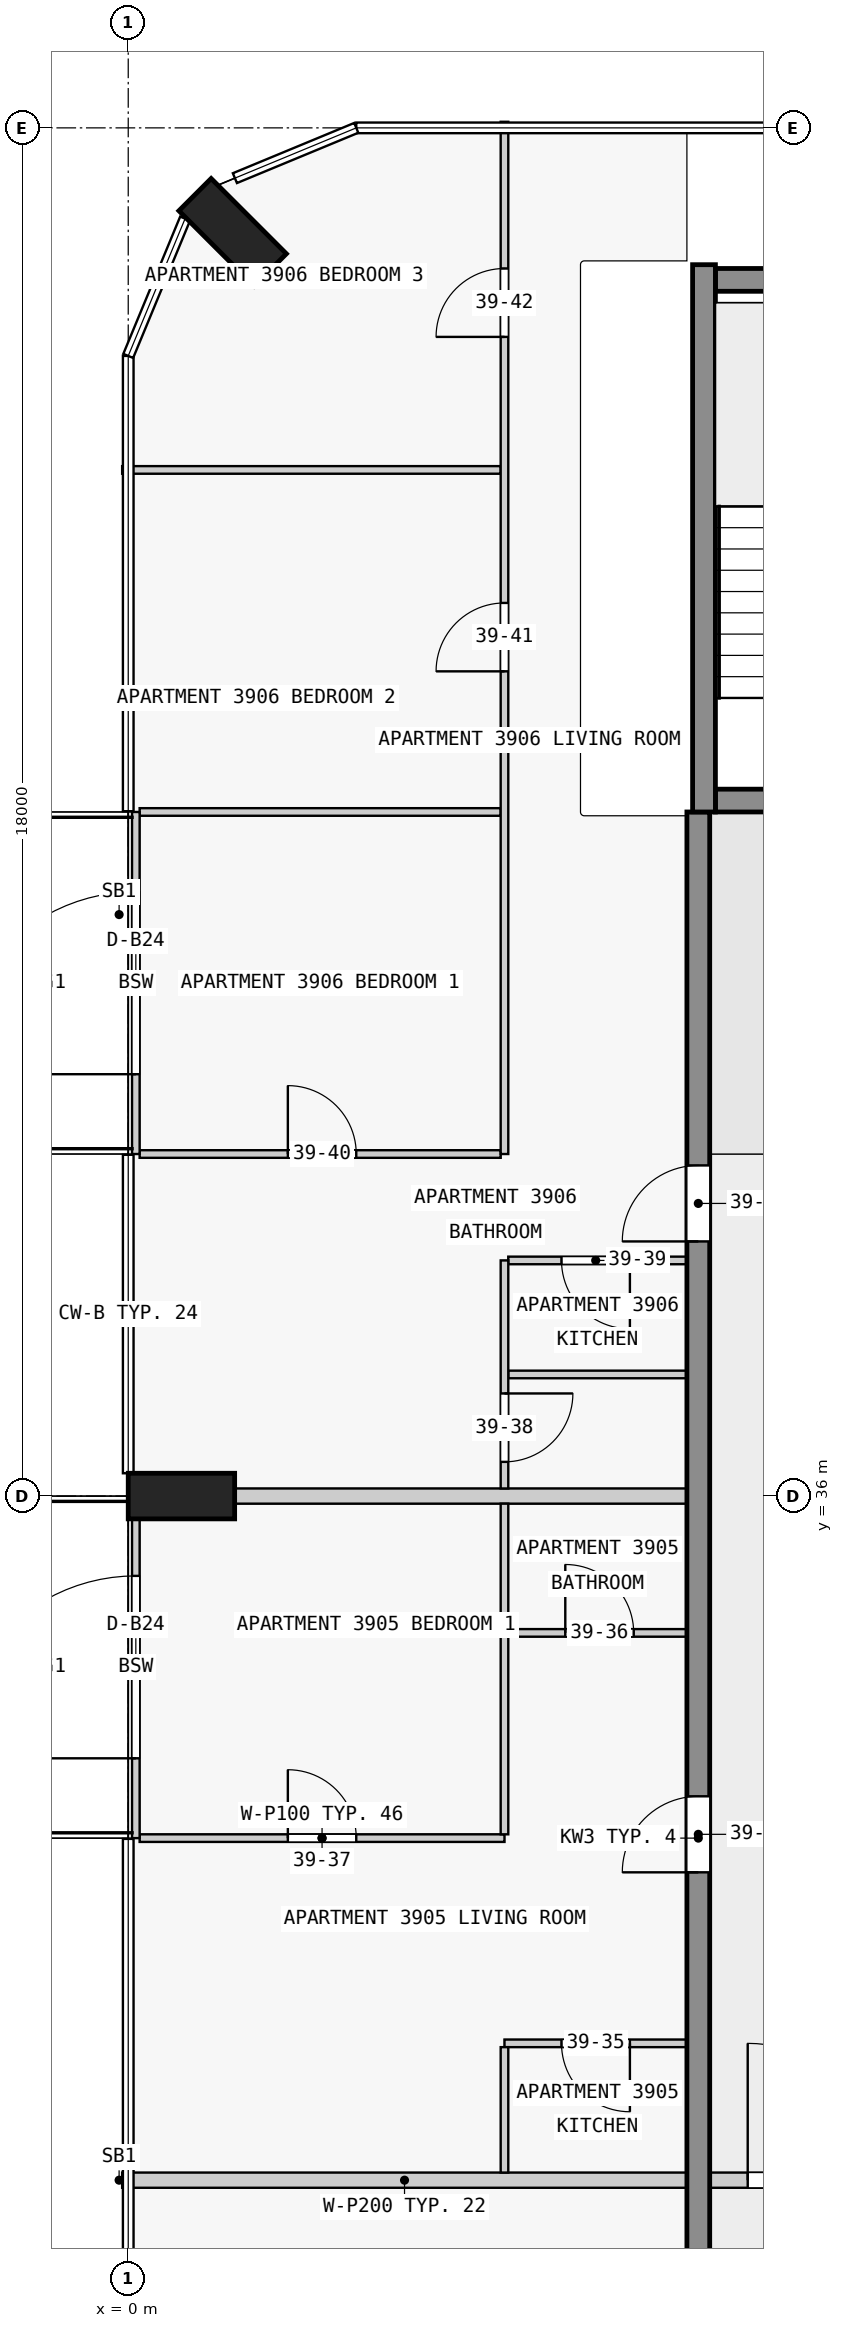
"""IFC4 building model, lengths in metres.
Left out: names, types, materials, properties, quantities, classifications, styles, units other than length and angle.
Written with IfcOpenShell. Run it as: python <this file> out.ifc"""

import sys

from ifc_helpers import new_model, si_unit, direction, frame, frame_2d, origin, origin_2d, place, context, subcontext, project, spatial, rectangle, extrude, element, fill, save


model = new_model("IFC4")
c1 = context("Model", 3, precision=1e-05, world=origin(), true_north=direction((0.0, 1.0)))
c2 = subcontext(c1, "Body", "Model", "MODEL_VIEW")
j1 = project(units=[si_unit("LENGTHUNIT", "METRE"), si_unit("PLANEANGLEUNIT", "RADIAN")], contexts=[c1])
p1 = place(None, origin())
s1 = spatial("IfcSite", under=j1, at=p1, CompositionType="ELEMENT")
p2 = place(p1, origin())
s2 = spatial("IfcBuilding", under=s1, at=p2, CompositionType="ELEMENT")
p3 = place(p2, frame((0.0, 0.0, 153.4)))
s3 = spatial("IfcBuildingStorey", under=s2, at=p3, CompositionType="ELEMENT", Elevation=153.4)
for number, where, z_axis, x_axis in (
    (1, (1.374, 52.626, 0.0), (0.0, 0.0, 1.0), (0.707, 0.707, 0.0)),
    (2, (0.7, 36.0, 0.0), (0.0, 0.0, 1.0), (0.0, 1.0, 0.0)),
):
    element("IfcColumn", number, at=place(p3, frame(where, z_axis=z_axis, x_axis=x_axis)), inside=s3, PredefinedType="COLUMN", context=c2, shape_type="SweptSolid", body=[
        extrude(rectangle(XDim=0.6, YDim=1.4, at=origin_2d()), origin(), (0.0, 0.0, 1.0), 3.5),
    ])
p4 = place(p3, frame((7.725, 45.15, 0.0), z_axis=(0.0, 0.0, 1.0), x_axis=(1.0, 0.0, 0.0)))
e3 = element("IfcWall", 3, at=p4, inside=s3, PredefinedType="SHEAR", context=c2, shape_type="SweptSolid", body=[
    extrude(rectangle(XDim=2.55, YDim=0.3, at=frame_2d((1.275, 0.0))), origin(), (0.0, 0.0, 1.0), 3.5),
])
p5 = place(p4, frame((0.725, 0.0, 0.0)))
e4 = element("IfcOpeningElement", 4, at=p5, cuts=e3, PredefinedType="OPENING", context=c2, shape_type="SweptSolid", body=[
    extrude(rectangle(XDim=1.1, YDim=2.1, at=frame_2d((0.55, 1.05))), frame((0.0, 0.16, 0.0), z_axis=(0.0, -1.0, 0.0), x_axis=(1.0, 0.0, 0.0)), (0.0, 0.0, 1.0), 0.32),
])
p6 = place(p3, frame((7.725, 52.0, 0.0), z_axis=(0.0, 0.0, 1.0), x_axis=(1.0, 0.0, 0.0)))
e5 = element("IfcWall", 5, at=p6, inside=s3, PredefinedType="SHEAR", context=c2, shape_type="SweptSolid", body=[
    extrude(rectangle(XDim=2.55, YDim=0.3, at=frame_2d((1.275, 0.0))), origin(), (0.0, 0.0, 1.0), 3.5),
])
p7 = place(p3, frame((7.575, 45.0, 0.0), z_axis=(0.0, 0.0, 1.0), x_axis=(0.0, 1.0, 0.0)))
e6 = element("IfcWall", 6, at=p7, inside=s3, PredefinedType="SHEAR", context=c2, shape_type="SweptSolid", body=[
    extrude(rectangle(XDim=7.2, YDim=0.3, at=frame_2d((3.6, 0.0))), origin(), (0.0, 0.0, 1.0), 3.5),
])
p8 = place(p3, frame((7.5, 18.0, 0.0), z_axis=(0.0, 0.0, 1.0), x_axis=(0.0, 1.0, 0.0)))
e7 = element("IfcWall", 7, at=p8, inside=s3, PredefinedType="SHEAR", context=c2, shape_type="SweptSolid", body=[
    extrude(rectangle(XDim=27.0, YDim=0.3, at=frame_2d((13.5, 0.0))), origin(), (0.0, 0.0, 1.0), 3.25),
])
p9 = place(p8, frame((1.75, 0.0, 0.0)))
e8 = element("IfcOpeningElement", 8, at=p9, cuts=e7, PredefinedType="OPENING", context=c2, shape_type="SweptSolid", body=[
    extrude(rectangle(XDim=1.0, YDim=2.1, at=frame_2d((0.5, 1.05))), frame((0.0, 0.16, 0.0), z_axis=(0.0, -1.0, 0.0), x_axis=(1.0, 0.0, 0.0)), (0.0, 0.0, 1.0), 0.32),
])
p10 = place(p8, frame((5.85, 0.0, 0.0)))
e9 = element("IfcOpeningElement", 9, at=p10, cuts=e7, PredefinedType="OPENING", context=c2, shape_type="SweptSolid", body=[
    extrude(rectangle(XDim=1.8, YDim=2.1, at=frame_2d((0.9, 1.05))), frame((0.0, 0.16, 0.0), z_axis=(0.0, -1.0, 0.0), x_axis=(1.0, 0.0, 0.0)), (0.0, 0.0, 1.0), 0.32),
])
p11 = place(p8, frame((13.05, 0.0, 0.0)))
e10 = element("IfcOpeningElement", 10, at=p11, cuts=e7, PredefinedType="OPENING", context=c2, shape_type="SweptSolid", body=[
    extrude(rectangle(XDim=1.0, YDim=2.1, at=frame_2d((0.5, 1.05))), frame((0.0, 0.16, 0.0), z_axis=(0.0, -1.0, 0.0), x_axis=(1.0, 0.0, 0.0)), (0.0, 0.0, 1.0), 0.32),
])
p12 = place(p8, frame((21.35, 0.0, 0.0)))
e11 = element("IfcOpeningElement", 11, at=p12, cuts=e7, PredefinedType="OPENING", context=c2, shape_type="SweptSolid", body=[
    extrude(rectangle(XDim=1.0, YDim=2.1, at=frame_2d((0.5, 1.05))), frame((0.0, 0.16, 0.0), z_axis=(0.0, -1.0, 0.0), x_axis=(1.0, 0.0, 0.0)), (0.0, 0.0, 1.0), 0.32),
])
p13 = place(p3, frame((0.1, 31.5, 0.0), z_axis=(0.0, 0.0, 1.0), x_axis=(0.0, 1.0, 0.0)))
e12 = element("IfcWall", 12, at=p13, inside=s3, PredefinedType="STANDARD", context=c2, shape_type="SweptSolid", body=[
    extrude(rectangle(XDim=4.5, YDim=0.1, at=frame_2d((2.25, 0.0))), origin(), (0.0, 0.0, 1.0), 3.25),
])
p14 = place(p13, frame((1.05, 0.0, 0.0)))
e13 = element("IfcOpeningElement", 13, at=p14, cuts=e12, PredefinedType="OPENING", context=c2, shape_type="SweptSolid", body=[
    extrude(rectangle(XDim=2.4, YDim=2.4, at=frame_2d((1.2, 1.2))), frame((0.0, 0.06, 0.0), z_axis=(0.0, -1.0, 0.0), x_axis=(1.0, 0.0, 0.0)), (0.0, 0.0, 1.0), 0.12),
])
p15 = place(p3, frame((0.1, 40.5, 0.0), z_axis=(0.0, 0.0, 1.0), x_axis=(0.0, 1.0, 0.0)))
e14 = element("IfcWall", 14, at=p15, inside=s3, PredefinedType="STANDARD", context=c2, shape_type="SweptSolid", body=[
    extrude(rectangle(XDim=4.5, YDim=0.1, at=frame_2d((2.25, 0.0))), origin(), (0.0, 0.0, 1.0), 3.25),
])
p16 = place(p15, frame((1.05, 0.0, 0.0)))
e15 = element("IfcOpeningElement", 15, at=p16, cuts=e14, PredefinedType="OPENING", context=c2, shape_type="SweptSolid", body=[
    extrude(rectangle(XDim=2.4, YDim=2.4, at=frame_2d((1.2, 1.2))), frame((0.0, 0.06, 0.0), z_axis=(0.0, -1.0, 0.0), x_axis=(1.0, 0.0, 0.0)), (0.0, 0.0, 1.0), 0.12),
])
p17 = place(p3, frame((7.35, 27.0, 0.0), z_axis=(0.0, 0.0, 1.0), x_axis=(-1.0, 0.0, 0.0)))
e16 = element("IfcWall", 16, at=p17, inside=s3, PredefinedType="PARTITIONING", context=c2, shape_type="SweptSolid", body=[
    extrude(rectangle(XDim=7.43, YDim=0.2, at=frame_2d((3.715, 0.0))), origin(), (0.0, 0.0, 1.0), 3.25),
])
p18 = place(p3, frame((7.35, 28.8, 0.0), z_axis=(0.0, 0.0, 1.0), x_axis=(-1.0, 0.0, 0.0)))
e17 = element("IfcWall", 17, at=p18, inside=s3, PredefinedType="PARTITIONING", context=c2, shape_type="SweptSolid", body=[
    extrude(rectangle(XDim=2.4, YDim=0.1, at=frame_2d((1.2, 0.0))), origin(), (0.0, 0.0, 1.0), 3.25),
])
p19 = place(p18, frame((0.75, 0.0, 0.0)))
e18 = element("IfcOpeningElement", 18, at=p19, cuts=e17, PredefinedType="OPENING", context=c2, shape_type="SweptSolid", body=[
    extrude(rectangle(XDim=0.9, YDim=2.1, at=frame_2d((0.45, 1.05))), frame((0.0, 0.06, 0.0), z_axis=(0.0, -1.0, 0.0), x_axis=(1.0, 0.0, 0.0)), (0.0, 0.0, 1.0), 0.12),
])
p20 = place(p3, frame((0.15, 31.5, 0.0), z_axis=(0.0, 0.0, 1.0), x_axis=(1.0, 0.0, 0.0)))
e19 = element("IfcWall", 19, at=p20, inside=s3, PredefinedType="PARTITIONING", context=c2, shape_type="SweptSolid", body=[
    extrude(rectangle(XDim=4.8, YDim=0.1, at=frame_2d((2.4, 0.0))), origin(), (0.0, 0.0, 1.0), 3.25),
])
p21 = place(p20, frame((1.95, 0.0, 0.0)))
e20 = element("IfcOpeningElement", 20, at=p21, cuts=e19, PredefinedType="OPENING", context=c2, shape_type="SweptSolid", body=[
    extrude(rectangle(XDim=0.9, YDim=2.1, at=frame_2d((0.45, 1.05))), frame((0.0, 0.06, 0.0), z_axis=(0.0, -1.0, 0.0), x_axis=(1.0, 0.0, 0.0)), (0.0, 0.0, 1.0), 0.12),
])
p22 = place(p3, frame((5.0, 34.2, 0.0), z_axis=(0.0, 0.0, 1.0), x_axis=(1.0, 0.0, 0.0)))
e21 = element("IfcWall", 21, at=p22, inside=s3, PredefinedType="PARTITIONING", context=c2, shape_type="SweptSolid", body=[
    extrude(rectangle(XDim=2.35, YDim=0.1, at=frame_2d((1.175, 0.0))), origin(), (0.0, 0.0, 1.0), 3.25),
])
p23 = place(p22, frame((0.75, 0.0, 0.0)))
e22 = element("IfcOpeningElement", 22, at=p23, cuts=e21, PredefinedType="OPENING", context=c2, shape_type="SweptSolid", body=[
    extrude(rectangle(XDim=0.9, YDim=2.1, at=frame_2d((0.45, 1.05))), frame((0.0, 0.06, 0.0), z_axis=(0.0, -1.0, 0.0), x_axis=(1.0, 0.0, 0.0)), (0.0, 0.0, 1.0), 0.12),
])
p24 = place(p3, frame((7.35, 36.0, 0.0), z_axis=(0.0, 0.0, 1.0), x_axis=(-1.0, 0.0, 0.0)))
e23 = element("IfcWall", 23, at=p24, inside=s3, PredefinedType="PARTITIONING", context=c2, shape_type="SweptSolid", body=[
    extrude(rectangle(XDim=5.95, YDim=0.2, at=frame_2d((2.975, 0.0))), origin(), (0.0, 0.0, 1.0), 3.25),
])
p25 = place(p3, frame((7.35, 37.6, 0.0), z_axis=(0.0, 0.0, 1.0), x_axis=(-1.0, 0.0, 0.0)))
e24 = element("IfcWall", 24, at=p25, inside=s3, PredefinedType="PARTITIONING", context=c2, shape_type="SweptSolid", body=[
    extrude(rectangle(XDim=2.35, YDim=0.1, at=frame_2d((1.175, 0.0))), origin(), (0.0, 0.0, 1.0), 3.25),
])
p26 = place(p3, frame((7.35, 39.1, 0.0), z_axis=(0.0, 0.0, 1.0), x_axis=(-1.0, 0.0, 0.0)))
e25 = element("IfcWall", 25, at=p26, inside=s3, PredefinedType="PARTITIONING", context=c2, shape_type="SweptSolid", body=[
    extrude(rectangle(XDim=2.35, YDim=0.1, at=frame_2d((1.175, 0.0))), origin(), (0.0, 0.0, 1.0), 3.25),
])
p27 = place(p26, frame((0.75, 0.0, 0.0)))
e26 = element("IfcOpeningElement", 26, at=p27, cuts=e25, PredefinedType="OPENING", context=c2, shape_type="SweptSolid", body=[
    extrude(rectangle(XDim=0.9, YDim=2.1, at=frame_2d((0.45, 1.05))), frame((0.0, 0.06, 0.0), z_axis=(0.0, -1.0, 0.0), x_axis=(1.0, 0.0, 0.0)), (0.0, 0.0, 1.0), 0.12),
])
p28 = place(p3, frame((0.15, 40.5, 0.0), z_axis=(0.0, 0.0, 1.0), x_axis=(1.0, 0.0, 0.0)))
e27 = element("IfcWall", 27, at=p28, inside=s3, PredefinedType="PARTITIONING", context=c2, shape_type="SweptSolid", body=[
    extrude(rectangle(XDim=4.75, YDim=0.1, at=frame_2d((2.375, 0.0))), origin(), (0.0, 0.0, 1.0), 3.25),
])
p29 = place(p28, frame((1.95, 0.0, 0.0)))
e28 = element("IfcOpeningElement", 28, at=p29, cuts=e27, PredefinedType="OPENING", context=c2, shape_type="SweptSolid", body=[
    extrude(rectangle(XDim=0.9, YDim=2.1, at=frame_2d((0.45, 1.05))), frame((0.0, 0.06, 0.0), z_axis=(0.0, -1.0, 0.0), x_axis=(1.0, 0.0, 0.0)), (0.0, 0.0, 1.0), 0.12),
])
p30 = place(p3, frame((4.9, 45.0, 0.0), z_axis=(0.0, 0.0, 1.0), x_axis=(-1.0, 0.0, 0.0)))
e29 = element("IfcWall", 29, at=p30, inside=s3, PredefinedType="PARTITIONING", context=c2, shape_type="SweptSolid", body=[
    extrude(rectangle(XDim=4.75, YDim=0.1, at=frame_2d((2.375, 0.0))), origin(), (0.0, 0.0, 1.0), 3.25),
])
p31 = place(p3, frame((4.9, 49.5, 0.0), z_axis=(0.0, 0.0, 1.0), x_axis=(-1.0, 0.0, 0.0)))
e30 = element("IfcWall", 30, at=p31, inside=s3, PredefinedType="PARTITIONING", context=c2, shape_type="SweptSolid", body=[
    extrude(rectangle(XDim=4.98, YDim=0.1, at=frame_2d((2.49, 0.0))), origin(), (0.0, 0.0, 1.0), 3.25),
])
p32 = place(p3, frame((4.95, 28.75, 0.0), z_axis=(0.0, 0.0, 1.0), x_axis=(0.0, -1.0, 0.0)))
e31 = element("IfcWall", 31, at=p32, inside=s3, PredefinedType="PARTITIONING", context=c2, shape_type="SweptSolid", body=[
    extrude(rectangle(XDim=1.65, YDim=0.1, at=frame_2d((0.825, 0.0))), origin(), (0.0, 0.0, 1.0), 3.25),
])
p33 = place(p3, frame((4.95, 35.9, 0.0), z_axis=(0.0, 0.0, 1.0), x_axis=(0.0, -1.0, 0.0)))
e32 = element("IfcWall", 32, at=p33, inside=s3, PredefinedType="PARTITIONING", context=c2, shape_type="SweptSolid", body=[
    extrude(rectangle(XDim=1.7, YDim=0.1, at=frame_2d((0.85, 0.0))), origin(), (0.0, 0.0, 1.0), 3.25),
])
p34 = place(p3, frame((4.95, 39.1, 0.0), z_axis=(0.0, 0.0, 1.0), x_axis=(0.0, -1.0, 0.0)))
e33 = element("IfcWall", 33, at=p34, inside=s3, PredefinedType="PARTITIONING", context=c2, shape_type="SweptSolid", body=[
    extrude(rectangle(XDim=3.0, YDim=0.1, at=frame_2d((1.5, 0.0))), origin(), (0.0, 0.0, 1.0), 3.25),
])
p35 = place(p34, frame((1.75, 0.0, 0.0)))
e34 = element("IfcOpeningElement", 34, at=p35, cuts=e33, PredefinedType="OPENING", context=c2, shape_type="SweptSolid", body=[
    extrude(rectangle(XDim=0.9, YDim=2.1, at=frame_2d((0.45, 1.05))), frame((0.0, 0.06, 0.0), z_axis=(0.0, -1.0, 0.0), x_axis=(1.0, 0.0, 0.0)), (0.0, 0.0, 1.0), 0.12),
])
p36 = place(p3, frame((4.95, 31.55, 0.0), z_axis=(0.0, 0.0, 1.0), x_axis=(0.0, 1.0, 0.0)))
e35 = element("IfcWall", 35, at=p36, inside=s3, PredefinedType="PARTITIONING", context=c2, shape_type="SweptSolid", body=[
    extrude(rectangle(XDim=2.6, YDim=0.1, at=frame_2d((1.3, 0.0))), origin(), (0.0, 0.0, 1.0), 3.25),
])
p37 = place(p3, frame((4.95, 40.5, 0.0), z_axis=(0.0, 0.0, 1.0), x_axis=(0.0, 1.0, 0.0)))
e36 = element("IfcWall", 36, at=p37, inside=s3, PredefinedType="PARTITIONING", context=c2, shape_type="SweptSolid", body=[
    extrude(rectangle(XDim=13.58, YDim=0.1, at=frame_2d((6.79, 0.0))), origin(), (0.0, 0.0, 1.0), 3.25),
])
p38 = place(p37, frame((6.35, 0.0, 0.0)))
e37 = element("IfcOpeningElement", 37, at=p38, cuts=e36, PredefinedType="OPENING", context=c2, shape_type="SweptSolid", body=[
    extrude(rectangle(XDim=0.9, YDim=2.1, at=frame_2d((0.45, 1.05))), frame((0.0, 0.06, 0.0), z_axis=(0.0, -1.0, 0.0), x_axis=(1.0, 0.0, 0.0)), (0.0, 0.0, 1.0), 0.12),
])
p39 = place(p37, frame((10.75, 0.0, 0.0)))
e38 = element("IfcOpeningElement", 38, at=p39, cuts=e36, PredefinedType="OPENING", context=c2, shape_type="SweptSolid", body=[
    extrude(rectangle(XDim=0.9, YDim=2.1, at=frame_2d((0.45, 1.05))), frame((0.0, 0.06, 0.0), z_axis=(0.0, -1.0, 0.0), x_axis=(1.0, 0.0, 0.0)), (0.0, 0.0, 1.0), 0.12),
])
p40 = place(p3, frame((7.45, 27.0, 0.0), z_axis=(0.0, 0.0, 1.0), x_axis=(1.0, 0.0, 0.0)))
e39 = element("IfcWall", 39, at=p40, inside=s3, PredefinedType="PARTITIONING", context=c2, shape_type="SweptSolid", body=[
    extrude(rectangle(XDim=3.2, YDim=0.2, at=frame_2d((1.6, 0.0))), origin(), (0.0, 0.0, 1.0), 3.25),
])
p41 = place(p40, frame((0.7, 0.0, 0.0)))
e40 = element("IfcOpeningElement", 40, at=p41, cuts=e39, PredefinedType="OPENING", context=c2, shape_type="SweptSolid", body=[
    extrude(rectangle(XDim=1.8, YDim=2.1, at=frame_2d((0.9, 1.05))), frame((0.0, 0.11, 0.0), z_axis=(0.0, -1.0, 0.0), x_axis=(1.0, 0.0, 0.0)), (0.0, 0.0, 1.0), 0.22),
])
p42 = place(p14, origin())
e41 = element("IfcDoor", 41, at=p42, inside=s3, OperationType="SINGLE_SWING_LEFT", PredefinedType="DOOR", context=c2, shape_type="SweptSolid", body=[
    extrude(rectangle(XDim=2.4, YDim=2.4, at=frame_2d((1.2, 1.2))), frame((0.0, 0.025, 0.0), z_axis=(0.0, -1.0, 0.0), x_axis=(1.0, 0.0, 0.0)), (0.0, 0.0, 1.0), 0.05),
])
fill(e13, e41)
p43 = place(p16, origin())
e42 = element("IfcDoor", 42, at=p43, inside=s3, OperationType="SINGLE_SWING_LEFT", PredefinedType="DOOR", context=c2, shape_type="SweptSolid", body=[
    extrude(rectangle(XDim=2.4, YDim=2.4, at=frame_2d((1.2, 1.2))), frame((0.0, 0.025, 0.0), z_axis=(0.0, -1.0, 0.0), x_axis=(1.0, 0.0, 0.0)), (0.0, 0.0, 1.0), 0.05),
])
fill(e15, e42)
p44 = place(p11, origin())
e43 = element("IfcDoor", 43, at=p44, inside=s3, OperationType="SINGLE_SWING_RIGHT", PredefinedType="DOOR", context=c2, shape_type="SweptSolid", body=[
    extrude(rectangle(XDim=1.0, YDim=2.1, at=frame_2d((0.5, 1.05))), frame((0.0, 0.025, 0.0), z_axis=(0.0, -1.0, 0.0), x_axis=(1.0, 0.0, 0.0)), (0.0, 0.0, 1.0), 0.05),
])
fill(e10, e43)
p45 = place(p12, origin())
e44 = element("IfcDoor", 44, at=p45, inside=s3, OperationType="SINGLE_SWING_RIGHT", PredefinedType="DOOR", context=c2, shape_type="SweptSolid", body=[
    extrude(rectangle(XDim=1.0, YDim=2.1, at=frame_2d((0.5, 1.05))), frame((0.0, 0.025, 0.0), z_axis=(0.0, -1.0, 0.0), x_axis=(1.0, 0.0, 0.0)), (0.0, 0.0, 1.0), 0.05),
])
fill(e11, e44)
p46 = place(p41, origin())
e45 = element("IfcDoor", 45, at=p46, inside=s3, OperationType="SINGLE_SWING_LEFT", PredefinedType="DOOR", context=c2, shape_type="SweptSolid", body=[
    extrude(rectangle(XDim=1.8, YDim=2.1, at=frame_2d((0.9, 1.05))), frame((0.0, 0.025, 0.0), z_axis=(0.0, -1.0, 0.0), x_axis=(1.0, 0.0, 0.0)), (0.0, 0.0, 1.0), 0.05),
])
fill(e40, e45)
p47 = place(p19, origin())
e46 = element("IfcDoor", 46, at=p47, inside=s3, OperationType="SINGLE_SWING_RIGHT", PredefinedType="DOOR", context=c2, shape_type="SweptSolid", body=[
    extrude(rectangle(XDim=0.9, YDim=2.1, at=frame_2d((0.45, 1.05))), frame((0.0, 0.025, 0.0), z_axis=(0.0, -1.0, 0.0), x_axis=(1.0, 0.0, 0.0)), (0.0, 0.0, 1.0), 0.05),
])
fill(e18, e46)
p48 = place(p23, origin())
e47 = element("IfcDoor", 47, at=p48, inside=s3, OperationType="SINGLE_SWING_RIGHT", PredefinedType="DOOR", context=c2, shape_type="SweptSolid", body=[
    extrude(rectangle(XDim=0.9, YDim=2.1, at=frame_2d((0.45, 1.05))), frame((0.0, 0.025, 0.0), z_axis=(0.0, -1.0, 0.0), x_axis=(1.0, 0.0, 0.0)), (0.0, 0.0, 1.0), 0.05),
])
fill(e22, e47)
p49 = place(p21, origin())
e48 = element("IfcDoor", 48, at=p49, inside=s3, OperationType="SINGLE_SWING_LEFT", PredefinedType="DOOR", context=c2, shape_type="SweptSolid", body=[
    extrude(rectangle(XDim=0.9, YDim=2.1, at=frame_2d((0.45, 1.05))), frame((0.0, 0.025, 0.0), z_axis=(0.0, -1.0, 0.0), x_axis=(1.0, 0.0, 0.0)), (0.0, 0.0, 1.0), 0.05),
])
fill(e20, e48)
p50 = place(p35, origin())
e49 = element("IfcDoor", 49, at=p50, inside=s3, OperationType="SINGLE_SWING_RIGHT", PredefinedType="DOOR", context=c2, shape_type="SweptSolid", body=[
    extrude(rectangle(XDim=0.9, YDim=2.1, at=frame_2d((0.45, 1.05))), frame((0.0, 0.025, 0.0), z_axis=(0.0, -1.0, 0.0), x_axis=(1.0, 0.0, 0.0)), (0.0, 0.0, 1.0), 0.05),
])
fill(e34, e49)
p51 = place(p27, origin())
e50 = element("IfcDoor", 50, at=p51, inside=s3, OperationType="SINGLE_SWING_RIGHT", PredefinedType="DOOR", context=c2, shape_type="SweptSolid", body=[
    extrude(rectangle(XDim=0.9, YDim=2.1, at=frame_2d((0.45, 1.05))), frame((0.0, 0.025, 0.0), z_axis=(0.0, -1.0, 0.0), x_axis=(1.0, 0.0, 0.0)), (0.0, 0.0, 1.0), 0.05),
])
fill(e26, e50)
p52 = place(p29, origin())
e51 = element("IfcDoor", 51, at=p52, inside=s3, OperationType="SINGLE_SWING_RIGHT", PredefinedType="DOOR", context=c2, shape_type="SweptSolid", body=[
    extrude(rectangle(XDim=0.9, YDim=2.1, at=frame_2d((0.45, 1.05))), frame((0.0, 0.025, 0.0), z_axis=(0.0, -1.0, 0.0), x_axis=(1.0, 0.0, 0.0)), (0.0, 0.0, 1.0), 0.05),
])
fill(e28, e51)
p53 = place(p38, origin())
e52 = element("IfcDoor", 52, at=p53, inside=s3, OperationType="SINGLE_SWING_RIGHT", PredefinedType="DOOR", context=c2, shape_type="SweptSolid", body=[
    extrude(rectangle(XDim=0.9, YDim=2.1, at=frame_2d((0.45, 1.05))), frame((0.0, 0.025, 0.0), z_axis=(0.0, -1.0, 0.0), x_axis=(1.0, 0.0, 0.0)), (0.0, 0.0, 1.0), 0.05),
])
fill(e37, e52)
p54 = place(p39, origin())
e53 = element("IfcDoor", 53, at=p54, inside=s3, OperationType="SINGLE_SWING_RIGHT", PredefinedType="DOOR", context=c2, shape_type="SweptSolid", body=[
    extrude(rectangle(XDim=0.9, YDim=2.1, at=frame_2d((0.45, 1.05))), frame((0.0, 0.025, 0.0), z_axis=(0.0, -1.0, 0.0), x_axis=(1.0, 0.0, 0.0)), (0.0, 0.0, 1.0), 0.05),
])
fill(e38, e53)
save(model, sys.argv[1])
